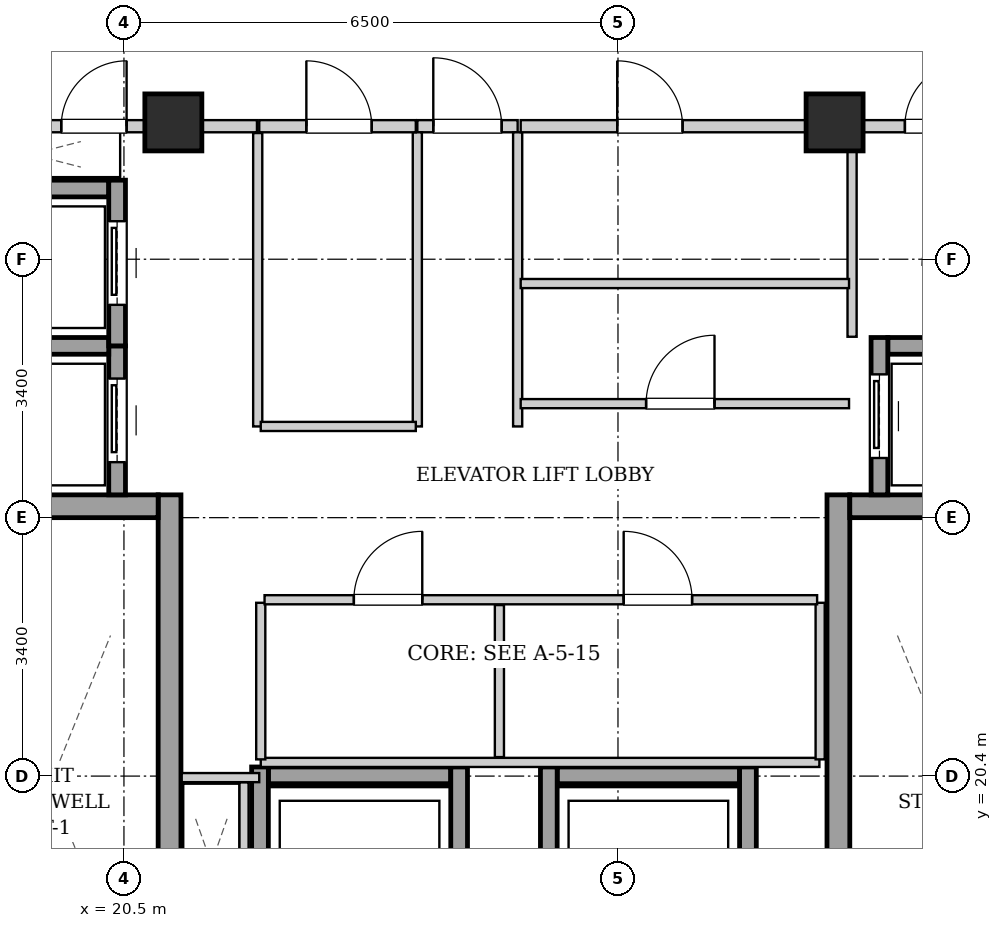
"""IFC4 building model, lengths in metres.
Left out: names, types, materials, properties, quantities, classifications, styles, units other than length and angle.
Written with IfcOpenShell. Run it as: python <this file> out.ifc"""

import sys

from ifc_helpers import new_model, si_unit, direction, frame, frame_2d, origin, origin_2d, place, context, subcontext, project, spatial, rectangle, extrude, element, fill, save


model = new_model("IFC4")
c1 = context("Model", 3, precision=1e-05, world=origin(), true_north=direction((0.0, 1.0)))
c2 = subcontext(c1, "Body", "Model", "MODEL_VIEW")
j1 = project(units=[si_unit("LENGTHUNIT", "METRE"), si_unit("PLANEANGLEUNIT", "RADIAN")], contexts=[c1])
p1 = place(None, origin())
s1 = spatial("IfcSite", under=j1, at=p1, CompositionType="ELEMENT")
p2 = place(p1, origin())
s2 = spatial("IfcBuilding", under=s1, at=p2, CompositionType="ELEMENT")
p3 = place(p2, frame((0.0, 0.0, 230.9)))
s3 = spatial("IfcBuildingStorey", under=s2, at=p3, CompositionType="ELEMENT", Elevation=230.9)
for number, where, z_axis, x_axis in (
    (1, (21.15, 29.0, 0.0), (0.0, 0.0, 1.0), (1.0, 0.0, 0.0)),
    (2, (29.85, 29.0, 0.0), (0.0, 0.0, 1.0), (1.0, 0.0, 0.0)),
):
    element("IfcColumn", number, at=place(p3, frame(where, z_axis=z_axis, x_axis=x_axis)), inside=s3, PredefinedType="COLUMN", context=c2, shape_type="SweptSolid", body=[
        extrude(rectangle(XDim=0.75, YDim=0.75, at=origin_2d()), origin(), (0.0, 0.0, 1.0), 3.4),
    ])
p4 = place(p3, frame((21.1, 15.1, 0.0), z_axis=(0.0, 0.0, 1.0), x_axis=(0.0, 1.0, 0.0)))
e3 = element("IfcWall", 3, at=p4, inside=s3, PredefinedType="SHEAR", context=c2, shape_type="SweptSolid", body=[
    extrude(rectangle(XDim=9.0, YDim=0.3, at=frame_2d((4.5, 0.0))), origin(), (0.0, 0.0, 1.0), 3.14),
])
p5 = place(p3, frame((18.1, 23.95, 0.0), z_axis=(0.0, 0.0, 1.0), x_axis=(1.0, 0.0, 0.0)))
e4 = element("IfcWall", 4, at=p5, inside=s3, PredefinedType="SHEAR", context=c2, shape_type="SweptSolid", body=[
    extrude(rectangle(XDim=2.85, YDim=0.3, at=frame_2d((1.425, 0.0))), origin(), (0.0, 0.0, 1.0), 3.14),
])
p6 = place(p3, frame((29.9, 15.1, 0.0), z_axis=(0.0, 0.0, 1.0), x_axis=(0.0, 1.0, 0.0)))
e5 = element("IfcWall", 5, at=p6, inside=s3, PredefinedType="SHEAR", context=c2, shape_type="SweptSolid", body=[
    extrude(rectangle(XDim=9.0, YDim=0.3, at=frame_2d((4.5, 0.0))), origin(), (0.0, 0.0, 1.0), 3.14),
])
p7 = place(p3, frame((30.05, 23.95, 0.0), z_axis=(0.0, 0.0, 1.0), x_axis=(1.0, 0.0, 0.0)))
e6 = element("IfcWall", 6, at=p7, inside=s3, PredefinedType="SHEAR", context=c2, shape_type="SweptSolid", body=[
    extrude(rectangle(XDim=2.85, YDim=0.3, at=frame_2d((1.425, 0.0))), origin(), (0.0, 0.0, 1.0), 3.14),
])
p8 = place(p3, frame((20.41, 24.1, 0.0), z_axis=(0.0, 0.0, 1.0), x_axis=(0.0, 1.0, 0.0)))
e7 = element("IfcWall", 7, at=p8, inside=s3, PredefinedType="SHEAR", context=c2, shape_type="SweptSolid", body=[
    extrude(rectangle(XDim=1.96, YDim=0.22, at=frame_2d((0.98, 0.0))), origin(), (0.0, 0.0, 1.0), 3.14),
])
p9 = place(p8, frame((0.43, 0.0, 0.0)))
e8 = element("IfcOpeningElement", 8, at=p9, cuts=e7, PredefinedType="OPENING", context=c2, shape_type="SweptSolid", body=[
    extrude(rectangle(XDim=1.1, YDim=2.15, at=frame_2d((0.55, 1.075))), frame((0.0, 0.12, 0.0), z_axis=(0.0, -1.0, 0.0), x_axis=(1.0, 0.0, 0.0)), (0.0, 0.0, 1.0), 0.24),
])
for number, where, z_axis, x_axis in (
    (9, (18.4, 26.06, 0.0), (0.0, 0.0, 1.0), (1.0, 0.0, 0.0)),
    (10, (18.4, 28.13, 0.0), (0.0, 0.0, 1.0), (1.0, 0.0, 0.0)),
):
    element("IfcWall", number, at=place(p3, frame(where, z_axis=z_axis, x_axis=x_axis)), inside=s3, PredefinedType="SHEAR", context=c2, shape_type="SweptSolid", body=[
        extrude(rectangle(XDim=1.9, YDim=0.22, at=frame_2d((0.95, 0.0))), origin(), (0.0, 0.0, 1.0), 3.14),
    ])
p10 = place(p3, frame((20.41, 26.06, 0.0), z_axis=(0.0, 0.0, 1.0), x_axis=(0.0, 1.0, 0.0)))
e11 = element("IfcWall", 11, at=p10, inside=s3, PredefinedType="SHEAR", context=c2, shape_type="SweptSolid", body=[
    extrude(rectangle(XDim=2.18, YDim=0.22, at=frame_2d((1.09, 0.0))), origin(), (0.0, 0.0, 1.0), 3.14),
])
p11 = place(p10, frame((0.54, 0.0, 0.0)))
e12 = element("IfcOpeningElement", 12, at=p11, cuts=e11, PredefinedType="OPENING", context=c2, shape_type="SweptSolid", body=[
    extrude(rectangle(XDim=1.1, YDim=2.15, at=frame_2d((0.55, 1.075))), frame((0.0, 0.12, 0.0), z_axis=(0.0, -1.0, 0.0), x_axis=(1.0, 0.0, 0.0)), (0.0, 0.0, 1.0), 0.24),
])
p12 = place(p3, frame((30.55, 26.06, 0.0), z_axis=(0.0, 0.0, 1.0), x_axis=(1.0, 0.0, 0.0)))
e13 = element("IfcWall", 13, at=p12, inside=s3, PredefinedType="SHEAR", context=c2, shape_type="SweptSolid", body=[
    extrude(rectangle(XDim=1.9, YDim=0.22, at=frame_2d((0.95, 0.0))), origin(), (0.0, 0.0, 1.0), 3.14),
])
p13 = place(p3, frame((30.44, 24.1, 0.0), z_axis=(0.0, 0.0, 1.0), x_axis=(0.0, 1.0, 0.0)))
e14 = element("IfcWall", 14, at=p13, inside=s3, PredefinedType="SHEAR", context=c2, shape_type="SweptSolid", body=[
    extrude(rectangle(XDim=2.07, YDim=0.22, at=frame_2d((1.035, 0.0))), origin(), (0.0, 0.0, 1.0), 3.14),
])
p14 = place(p13, frame((0.485, 0.0, 0.0)))
e15 = element("IfcOpeningElement", 15, at=p14, cuts=e14, PredefinedType="OPENING", context=c2, shape_type="SweptSolid", body=[
    extrude(rectangle(XDim=1.1, YDim=2.15, at=frame_2d((0.55, 1.075))), frame((0.0, 0.12, 0.0), z_axis=(0.0, -1.0, 0.0), x_axis=(1.0, 0.0, 0.0)), (0.0, 0.0, 1.0), 0.24),
])
p15 = place(p3, frame((22.4, 20.41, 0.0), z_axis=(0.0, 0.0, 1.0), x_axis=(1.0, 0.0, 0.0)))
e16 = element("IfcWall", 16, at=p15, inside=s3, PredefinedType="SHEAR", context=c2, shape_type="SweptSolid", body=[
    extrude(rectangle(XDim=2.4, YDim=0.22, at=frame_2d((1.2, 0.0))), origin(), (0.0, 0.0, 1.0), 3.14),
])
for number, where, z_axis, x_axis in (
    (17, (22.29, 17.98, 0.0), (0.0, 0.0, 1.0), (0.0, 1.0, 0.0)),
    (18, (24.91, 17.98, 0.0), (0.0, 0.0, 1.0), (0.0, 1.0, 0.0)),
):
    element("IfcWall", number, at=place(p3, frame(where, z_axis=z_axis, x_axis=x_axis)), inside=s3, PredefinedType="SHEAR", context=c2, shape_type="SweptSolid", body=[
        extrude(rectangle(XDim=2.54, YDim=0.22, at=frame_2d((1.27, 0.0))), origin(), (0.0, 0.0, 1.0), 3.14),
    ])
p16 = place(p3, frame((26.2, 20.41, 0.0), z_axis=(0.0, 0.0, 1.0), x_axis=(1.0, 0.0, 0.0)))
e19 = element("IfcWall", 19, at=p16, inside=s3, PredefinedType="SHEAR", context=c2, shape_type="SweptSolid", body=[
    extrude(rectangle(XDim=2.4, YDim=0.22, at=frame_2d((1.2, 0.0))), origin(), (0.0, 0.0, 1.0), 3.14),
])
for number, where, z_axis, x_axis in (
    (20, (26.09, 17.98, 0.0), (0.0, 0.0, 1.0), (0.0, 1.0, 0.0)),
    (21, (28.71, 17.98, 0.0), (0.0, 0.0, 1.0), (0.0, 1.0, 0.0)),
):
    element("IfcWall", number, at=place(p3, frame(where, z_axis=z_axis, x_axis=x_axis)), inside=s3, PredefinedType="SHEAR", context=c2, shape_type="SweptSolid", body=[
        extrude(rectangle(XDim=2.54, YDim=0.22, at=frame_2d((1.27, 0.0))), origin(), (0.0, 0.0, 1.0), 3.14),
    ])
p17 = place(p3, frame((24.36, 28.95, 0.0), z_axis=(0.0, 0.0, 1.0), x_axis=(1.0, 0.0, 0.0)))
e22 = element("IfcWall", 22, at=p17, inside=s3, PredefinedType="PARTITIONING", context=c2, shape_type="SweptSolid", body=[
    extrude(rectangle(XDim=1.32, YDim=0.16, at=frame_2d((0.66, 0.0))), origin(), (0.0, 0.0, 1.0), 2.668),
])
p18 = place(p17, frame((0.21, 0.0, 0.0)))
e23 = element("IfcOpeningElement", 23, at=p18, cuts=e22, PredefinedType="OPENING", context=c2, shape_type="SweptSolid", body=[
    extrude(rectangle(XDim=0.9, YDim=2.05, at=frame_2d((0.45, 1.025))), frame((0.0, 0.09, 0.0), z_axis=(0.0, -1.0, 0.0), x_axis=(1.0, 0.0, 0.0)), (0.0, 0.0, 1.0), 0.18),
])
p19 = place(p3, frame((17.96, 28.95, 0.0), z_axis=(0.0, 0.0, 1.0), x_axis=(1.0, 0.0, 0.0)))
e24 = element("IfcWall", 24, at=p19, inside=s3, PredefinedType="PARTITIONING", context=c2, shape_type="SweptSolid", body=[
    extrude(rectangle(XDim=4.29, YDim=0.16, at=frame_2d((2.145, 0.0))), origin(), (0.0, 0.0, 1.0), 2.668),
])
p20 = place(p19, frame((1.715, 0.0, 0.0)))
e25 = element("IfcOpeningElement", 25, at=p20, cuts=e24, PredefinedType="OPENING", context=c2, shape_type="SweptSolid", body=[
    extrude(rectangle(XDim=0.86, YDim=2.05, at=frame_2d((0.43, 1.025))), frame((0.0, 0.09, 0.0), z_axis=(0.0, -1.0, 0.0), x_axis=(1.0, 0.0, 0.0)), (0.0, 0.0, 1.0), 0.18),
])
p21 = place(p3, frame((22.08, 18.2, 0.0), z_axis=(0.0, 0.0, 1.0), x_axis=(0.0, 1.0, 0.0)))
e26 = element("IfcWall", 26, at=p21, inside=s3, PredefinedType="PARTITIONING", context=c2, shape_type="SweptSolid", body=[
    extrude(rectangle(XDim=2.12, YDim=0.12, at=frame_2d((1.06, 0.0))), origin(), (0.0, 0.0, 1.0), 3.14),
])
p22 = place(p3, frame((22.28, 20.38, 0.0), z_axis=(0.0, 0.0, 1.0), x_axis=(-1.0, 0.0, 0.0)))
e27 = element("IfcWall", 27, at=p22, inside=s3, PredefinedType="PARTITIONING", context=c2, shape_type="SweptSolid", body=[
    extrude(rectangle(XDim=1.02, YDim=0.12, at=frame_2d((0.51, 0.0))), origin(), (0.0, 0.0, 1.0), 3.14),
])
for number, where, z_axis, x_axis in (
    (28, (24.36, 25.0, 0.0), (0.0, 0.0, 1.0), (0.0, 1.0, 0.0)),
    (29, (25.68, 25.0, 0.0), (0.0, 0.0, 1.0), (0.0, 1.0, 0.0)),
):
    element("IfcWall", number, at=place(p3, frame(where, z_axis=z_axis, x_axis=x_axis)), inside=s3, PredefinedType="PARTITIONING", context=c2, shape_type="SweptSolid", body=[
        extrude(rectangle(XDim=3.87, YDim=0.12, at=frame_2d((1.935, 0.0))), origin(), (0.0, 0.0, 1.0), 3.14),
    ])
p23 = place(p3, frame((30.08, 26.18, 0.0), z_axis=(0.0, 0.0, 1.0), x_axis=(0.0, 1.0, 0.0)))
e30 = element("IfcWall", 30, at=p23, inside=s3, PredefinedType="PARTITIONING", context=c2, shape_type="SweptSolid", body=[
    extrude(rectangle(XDim=2.68, YDim=0.12, at=frame_2d((1.34, 0.0))), origin(), (0.0, 0.0, 1.0), 3.14),
])
p24 = place(p3, frame((30.08, 28.95, 0.0), z_axis=(0.0, 0.0, 1.0), x_axis=(1.0, 0.0, 0.0)))
e31 = element("IfcWall", 31, at=p24, inside=s3, PredefinedType="PARTITIONING", context=c2, shape_type="SweptSolid", body=[
    extrude(rectangle(XDim=2.96, YDim=0.16, at=frame_2d((1.48, 0.0))), origin(), (0.0, 0.0, 1.0), 3.14),
])
p25 = place(p24, frame((0.695, 0.0, 0.0)))
e32 = element("IfcOpeningElement", 32, at=p25, cuts=e31, PredefinedType="OPENING", context=c2, shape_type="SweptSolid", body=[
    extrude(rectangle(XDim=0.86, YDim=2.05, at=frame_2d((0.43, 1.025))), frame((0.0, 0.09, 0.0), z_axis=(0.0, -1.0, 0.0), x_axis=(1.0, 0.0, 0.0)), (0.0, 0.0, 1.0), 0.18),
])
p26 = place(p3, frame((22.26, 25.0, 0.0), z_axis=(0.0, 0.0, 1.0), x_axis=(0.0, 1.0, 0.0)))
e33 = element("IfcWall", 33, at=p26, inside=s3, PredefinedType="PARTITIONING", context=c2, shape_type="SweptSolid", body=[
    extrude(rectangle(XDim=3.86, YDim=0.12, at=frame_2d((1.93, 0.0))), origin(), (0.0, 0.0, 1.0), 3.14),
])
p27 = place(p3, frame((22.3, 25.0, 0.0), z_axis=(0.0, 0.0, 1.0), x_axis=(1.0, 0.0, 0.0)))
e34 = element("IfcWall", 34, at=p27, inside=s3, PredefinedType="PARTITIONING", context=c2, shape_type="SweptSolid", body=[
    extrude(rectangle(XDim=2.04, YDim=0.12, at=frame_2d((1.02, 0.0))), origin(), (0.0, 0.0, 1.0), 3.14),
])
p28 = place(p3, frame((22.28, 28.95, 0.0), z_axis=(0.0, 0.0, 1.0), x_axis=(1.0, 0.0, 0.0)))
e35 = element("IfcWall", 35, at=p28, inside=s3, PredefinedType="PARTITIONING", context=c2, shape_type="SweptSolid", body=[
    extrude(rectangle(XDim=2.06, YDim=0.16, at=frame_2d((1.03, 0.0))), origin(), (0.0, 0.0, 1.0), 2.668),
])
p29 = place(p28, frame((0.62, 0.0, 0.0)))
e36 = element("IfcOpeningElement", 36, at=p29, cuts=e35, PredefinedType="OPENING", context=c2, shape_type="SweptSolid", body=[
    extrude(rectangle(XDim=0.86, YDim=2.05, at=frame_2d((0.43, 1.025))), frame((0.0, 0.09, 0.0), z_axis=(0.0, -1.0, 0.0), x_axis=(1.0, 0.0, 0.0)), (0.0, 0.0, 1.0), 0.18),
])
p30 = place(p3, frame((25.72, 26.88, 0.0), z_axis=(0.0, 0.0, 1.0), x_axis=(1.0, 0.0, 0.0)))
e37 = element("IfcWall", 37, at=p30, inside=s3, PredefinedType="PARTITIONING", context=c2, shape_type="SweptSolid", body=[
    extrude(rectangle(XDim=4.32, YDim=0.12, at=frame_2d((2.16, 0.0))), origin(), (0.0, 0.0, 1.0), 3.14),
])
p31 = place(p3, frame((25.72, 25.3, 0.0), z_axis=(0.0, 0.0, 1.0), x_axis=(1.0, 0.0, 0.0)))
e38 = element("IfcWall", 38, at=p31, inside=s3, PredefinedType="PARTITIONING", context=c2, shape_type="SweptSolid", body=[
    extrude(rectangle(XDim=4.32, YDim=0.12, at=frame_2d((2.16, 0.0))), origin(), (0.0, 0.0, 1.0), 3.14),
])
p32 = place(p31, frame((1.65, 0.0, 0.0)))
e39 = element("IfcOpeningElement", 39, at=p32, cuts=e38, PredefinedType="OPENING", context=c2, shape_type="SweptSolid", body=[
    extrude(rectangle(XDim=0.9, YDim=2.05, at=frame_2d((0.45, 1.025))), frame((0.0, 0.07, 0.0), z_axis=(0.0, -1.0, 0.0), x_axis=(1.0, 0.0, 0.0)), (0.0, 0.0, 1.0), 0.14),
])
p33 = place(p3, frame((25.72, 28.95, 0.0), z_axis=(0.0, 0.0, 1.0), x_axis=(1.0, 0.0, 0.0)))
e40 = element("IfcWall", 40, at=p33, inside=s3, PredefinedType="PARTITIONING", context=c2, shape_type="SweptSolid", body=[
    extrude(rectangle(XDim=4.32, YDim=0.16, at=frame_2d((2.16, 0.0))), origin(), (0.0, 0.0, 1.0), 2.668),
])
p34 = place(p33, frame((1.27, 0.0, 0.0)))
e41 = element("IfcOpeningElement", 41, at=p34, cuts=e40, PredefinedType="OPENING", context=c2, shape_type="SweptSolid", body=[
    extrude(rectangle(XDim=0.86, YDim=2.05, at=frame_2d((0.43, 1.025))), frame((0.0, 0.09, 0.0), z_axis=(0.0, -1.0, 0.0), x_axis=(1.0, 0.0, 0.0)), (0.0, 0.0, 1.0), 0.18),
])
p35 = place(p3, frame((22.3, 20.58, 0.0), z_axis=(0.0, 0.0, 1.0), x_axis=(1.0, 0.0, 0.0)))
e42 = element("IfcWall", 42, at=p35, inside=s3, PredefinedType="PARTITIONING", context=c2, shape_type="SweptSolid", body=[
    extrude(rectangle(XDim=7.35, YDim=0.12, at=frame_2d((3.675, 0.0))), origin(), (0.0, 0.0, 1.0), 3.14),
])
for number, where, z_axis, x_axis in (
    (43, (22.3, 20.62, 0.0), (0.0, 0.0, 1.0), (0.0, 1.0, 0.0)),
    (44, (29.66, 20.62, 0.0), (0.0, 0.0, 1.0), (0.0, 1.0, 0.0)),
):
    element("IfcWall", number, at=place(p3, frame(where, z_axis=z_axis, x_axis=x_axis)), inside=s3, PredefinedType="PARTITIONING", context=c2, shape_type="SweptSolid", body=[
        extrude(rectangle(XDim=2.06, YDim=0.12, at=frame_2d((1.03, 0.0))), origin(), (0.0, 0.0, 1.0), 3.14),
    ])
p36 = place(p3, frame((25.44, 20.65, 0.0), z_axis=(0.0, 0.0, 1.0), x_axis=(0.0, 1.0, 0.0)))
e45 = element("IfcWall", 45, at=p36, inside=s3, PredefinedType="PARTITIONING", context=c2, shape_type="SweptSolid", body=[
    extrude(rectangle(XDim=2.0, YDim=0.12, at=frame_2d((1.0, 0.0))), origin(), (0.0, 0.0, 1.0), 3.14),
])
p37 = place(p3, frame((22.35, 22.72, 0.0), z_axis=(0.0, 0.0, 1.0), x_axis=(1.0, 0.0, 0.0)))
e46 = element("IfcWall", 46, at=p37, inside=s3, PredefinedType="PARTITIONING", context=c2, shape_type="SweptSolid", body=[
    extrude(rectangle(XDim=7.27, YDim=0.12, at=frame_2d((3.635, 0.0))), origin(), (0.0, 0.0, 1.0), 3.14),
])
p38 = place(p37, frame((1.175, 0.0, 0.0)))
e47 = element("IfcOpeningElement", 47, at=p38, cuts=e46, PredefinedType="OPENING", context=c2, shape_type="SweptSolid", body=[
    extrude(rectangle(XDim=0.9, YDim=2.05, at=frame_2d((0.45, 1.025))), frame((0.0, 0.07, 0.0), z_axis=(0.0, -1.0, 0.0), x_axis=(1.0, 0.0, 0.0)), (0.0, 0.0, 1.0), 0.14),
])
p39 = place(p37, frame((4.725, 0.0, 0.0)))
e48 = element("IfcOpeningElement", 48, at=p39, cuts=e46, PredefinedType="OPENING", context=c2, shape_type="SweptSolid", body=[
    extrude(rectangle(XDim=0.9, YDim=2.05, at=frame_2d((0.45, 1.025))), frame((0.0, 0.07, 0.0), z_axis=(0.0, -1.0, 0.0), x_axis=(1.0, 0.0, 0.0)), (0.0, 0.0, 1.0), 0.14),
])
p40 = place(p9, origin())
e49 = element("IfcDoor", 49, at=p40, inside=s3, OperationType="SLIDING_TO_LEFT", PredefinedType="DOOR", context=c2, shape_type="SweptSolid", body=[
    extrude(rectangle(XDim=1.1, YDim=2.15, at=frame_2d((0.55, 1.075))), frame((0.0, 0.025, 0.0), z_axis=(0.0, -1.0, 0.0), x_axis=(1.0, 0.0, 0.0)), (0.0, 0.0, 1.0), 0.05),
])
fill(e8, e49)
p41 = place(p11, origin())
e50 = element("IfcDoor", 50, at=p41, inside=s3, OperationType="SLIDING_TO_LEFT", PredefinedType="DOOR", context=c2, shape_type="SweptSolid", body=[
    extrude(rectangle(XDim=1.1, YDim=2.15, at=frame_2d((0.55, 1.075))), frame((0.0, 0.025, 0.0), z_axis=(0.0, -1.0, 0.0), x_axis=(1.0, 0.0, 0.0)), (0.0, 0.0, 1.0), 0.05),
])
fill(e12, e50)
p42 = place(p14, origin())
e51 = element("IfcDoor", 51, at=p42, inside=s3, OperationType="SLIDING_TO_LEFT", PredefinedType="DOOR", context=c2, shape_type="SweptSolid", body=[
    extrude(rectangle(XDim=1.1, YDim=2.15, at=frame_2d((0.55, 1.075))), frame((0.0, 0.025, 0.0), z_axis=(0.0, -1.0, 0.0), x_axis=(1.0, 0.0, 0.0)), (0.0, 0.0, 1.0), 0.05),
])
fill(e15, e51)
p43 = place(p18, origin())
e52 = element("IfcDoor", 52, at=p43, inside=s3, OperationType="SINGLE_SWING_LEFT", PredefinedType="DOOR", context=c2, shape_type="SweptSolid", body=[
    extrude(rectangle(XDim=0.9, YDim=2.05, at=frame_2d((0.45, 1.025))), frame((0.0, 0.025, 0.0), z_axis=(0.0, -1.0, 0.0), x_axis=(1.0, 0.0, 0.0)), (0.0, 0.0, 1.0), 0.05),
])
fill(e23, e52)
p44 = place(p20, origin())
e53 = element("IfcDoor", 53, at=p44, inside=s3, OperationType="SINGLE_SWING_RIGHT", PredefinedType="DOOR", context=c2, shape_type="SweptSolid", body=[
    extrude(rectangle(XDim=0.86, YDim=2.05, at=frame_2d((0.43, 1.025))), frame((0.0, 0.025, 0.0), z_axis=(0.0, -1.0, 0.0), x_axis=(1.0, 0.0, 0.0)), (0.0, 0.0, 1.0), 0.05),
])
fill(e25, e53)
p45 = place(p25, origin())
e54 = element("IfcDoor", 54, at=p45, inside=s3, OperationType="SINGLE_SWING_RIGHT", PredefinedType="DOOR", context=c2, shape_type="SweptSolid", body=[
    extrude(rectangle(XDim=0.86, YDim=2.05, at=frame_2d((0.43, 1.025))), frame((0.0, 0.025, 0.0), z_axis=(0.0, -1.0, 0.0), x_axis=(1.0, 0.0, 0.0)), (0.0, 0.0, 1.0), 0.05),
])
fill(e32, e54)
p46 = place(p29, origin())
e55 = element("IfcDoor", 55, at=p46, inside=s3, OperationType="SINGLE_SWING_LEFT", PredefinedType="DOOR", context=c2, shape_type="SweptSolid", body=[
    extrude(rectangle(XDim=0.86, YDim=2.05, at=frame_2d((0.43, 1.025))), frame((0.0, 0.025, 0.0), z_axis=(0.0, -1.0, 0.0), x_axis=(1.0, 0.0, 0.0)), (0.0, 0.0, 1.0), 0.05),
])
fill(e36, e55)
p47 = place(p32, origin())
e56 = element("IfcDoor", 56, at=p47, inside=s3, OperationType="SINGLE_SWING_RIGHT", PredefinedType="DOOR", context=c2, shape_type="SweptSolid", body=[
    extrude(rectangle(XDim=0.9, YDim=2.05, at=frame_2d((0.45, 1.025))), frame((0.0, 0.025, 0.0), z_axis=(0.0, -1.0, 0.0), x_axis=(1.0, 0.0, 0.0)), (0.0, 0.0, 1.0), 0.05),
])
fill(e39, e56)
p48 = place(p34, origin())
e57 = element("IfcDoor", 57, at=p48, inside=s3, OperationType="SINGLE_SWING_LEFT", PredefinedType="DOOR", context=c2, shape_type="SweptSolid", body=[
    extrude(rectangle(XDim=0.86, YDim=2.05, at=frame_2d((0.43, 1.025))), frame((0.0, 0.025, 0.0), z_axis=(0.0, -1.0, 0.0), x_axis=(1.0, 0.0, 0.0)), (0.0, 0.0, 1.0), 0.05),
])
fill(e41, e57)
p49 = place(p38, origin())
e58 = element("IfcDoor", 58, at=p49, inside=s3, OperationType="SINGLE_SWING_RIGHT", PredefinedType="DOOR", context=c2, shape_type="SweptSolid", body=[
    extrude(rectangle(XDim=0.9, YDim=2.05, at=frame_2d((0.45, 1.025))), frame((0.0, 0.025, 0.0), z_axis=(0.0, -1.0, 0.0), x_axis=(1.0, 0.0, 0.0)), (0.0, 0.0, 1.0), 0.05),
])
fill(e47, e58)
p50 = place(p39, origin())
e59 = element("IfcDoor", 59, at=p50, inside=s3, OperationType="SINGLE_SWING_LEFT", PredefinedType="DOOR", context=c2, shape_type="SweptSolid", body=[
    extrude(rectangle(XDim=0.9, YDim=2.05, at=frame_2d((0.45, 1.025))), frame((0.0, 0.025, 0.0), z_axis=(0.0, -1.0, 0.0), x_axis=(1.0, 0.0, 0.0)), (0.0, 0.0, 1.0), 0.05),
])
fill(e48, e59)
save(model, sys.argv[1])
